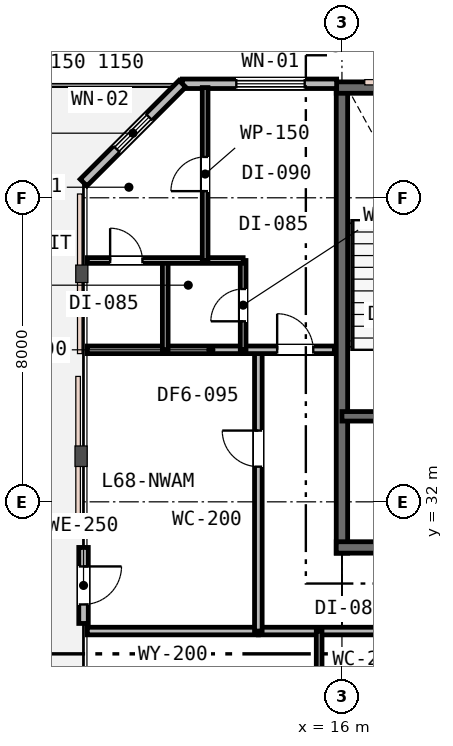
"""IFC4 building model, lengths in metres.
Left out: names, types, materials, properties, quantities, classifications, styles, units other than length and angle.
Written with IfcOpenShell. Run it as: python <this file> out.ifc"""

import sys

from ifc_helpers import new_model, si_unit, direction, frame, frame_2d, origin, place, context, subcontext, project, spatial, rectangle, extrude, element, fill, save


model = new_model("IFC4")
c1 = context("Model", 3, precision=1e-05, world=origin(), true_north=direction((0.0, 1.0)))
c2 = subcontext(c1, "Body", "Model", "MODEL_VIEW")
j1 = project(units=[si_unit("LENGTHUNIT", "METRE"), si_unit("PLANEANGLEUNIT", "RADIAN")], contexts=[c1])
p1 = place(None, origin())
s1 = spatial("IfcSite", under=j1, at=p1, CompositionType="ELEMENT")
p2 = place(p1, origin())
s2 = spatial("IfcBuilding", under=s1, at=p2, CompositionType="ELEMENT")
p3 = place(p2, frame((0.0, 0.0, 264.0)))
s3 = spatial("IfcBuildingStorey", under=s2, at=p3, CompositionType="ELEMENT", Elevation=264.0)
p4 = place(p3, frame((16.0, 30.65, 0.0), z_axis=(0.0, 0.0, 1.0), x_axis=(0.0, 1.0, 0.0)))
e1 = element("IfcWall", 1, at=p4, inside=s3, PredefinedType="SHEAR", context=c2, shape_type="SweptSolid", body=[
    extrude(rectangle(XDim=12.3, YDim=0.3, at=frame_2d((6.15, 0.0))), origin(), (0.0, 0.0, 1.0), 3.8),
])
p5 = place(p3, frame((15.85, 42.9, 0.0), z_axis=(0.0, 0.0, 1.0), x_axis=(1.0, 0.0, 0.0)))
e2 = element("IfcWall", 2, at=p5, inside=s3, PredefinedType="SHEAR", context=c2, shape_type="SweptSolid", body=[
    extrude(rectangle(XDim=24.3, YDim=0.3, at=frame_2d((12.15, 0.0))), origin(), (0.0, 0.0, 1.0), 3.8),
])
p6 = place(p3, frame((15.85, 30.8, 0.0), z_axis=(0.0, 0.0, 1.0), x_axis=(1.0, 0.0, 0.0)))
e3 = element("IfcWall", 3, at=p6, inside=s3, PredefinedType="SHEAR", context=c2, shape_type="SweptSolid", body=[
    extrude(rectangle(XDim=11.2, YDim=0.3, at=frame_2d((5.6, 0.0))), origin(), (0.0, 0.0, 1.0), 3.8),
])
p7 = place(p6, frame((2.45, 0.0, 0.0)))
e4 = element("IfcOpeningElement", 4, at=p7, cuts=e3, PredefinedType="OPENING", context=c2, shape_type="SweptSolid", body=[
    extrude(rectangle(XDim=1.1, YDim=2.15, at=frame_2d((0.55, 1.075))), frame((0.0, 0.16, 0.0), z_axis=(0.0, -1.0, 0.0), x_axis=(1.0, 0.0, 0.0)), (0.0, 0.0, 1.0), 0.32),
])
p8 = place(p3, frame((16.0, 34.25, 0.0), z_axis=(0.0, 0.0, 1.0), x_axis=(1.0, 0.0, 0.0)))
e5 = element("IfcWall", 5, at=p8, inside=s3, PredefinedType="SHEAR", context=c2, shape_type="SweptSolid", body=[
    extrude(rectangle(XDim=6.05, YDim=0.25, at=frame_2d((3.025, 0.0))), origin(), (0.0, 0.0, 1.0), 3.8),
])
p9 = place(p8, frame((1.25, 0.0, 0.0)))
e6 = element("IfcOpeningElement", 6, at=p9, cuts=e5, PredefinedType="OPENING", context=c2, shape_type="SweptSolid", body=[
    extrude(rectangle(XDim=1.0, YDim=2.15, at=frame_2d((0.5, 1.075))), frame((0.0, 0.135, 0.0), z_axis=(0.0, -1.0, 0.0), x_axis=(1.0, 0.0, 0.0)), (0.0, 0.0, 1.0), 0.27),
])
p10 = place(p8, frame((4.2, 0.0, 0.0)))
e7 = element("IfcOpeningElement", 7, at=p10, cuts=e5, PredefinedType="OPENING", context=c2, shape_type="SweptSolid", body=[
    extrude(rectangle(XDim=1.1, YDim=2.15, at=frame_2d((0.55, 1.075))), frame((0.0, 0.135, 0.0), z_axis=(0.0, -1.0, 0.0), x_axis=(1.0, 0.0, 0.0)), (0.0, 0.0, 1.0), 0.27),
])
p11 = place(p3, frame((15.86, 43.0, 0.0), z_axis=(0.0, 0.0, 1.0), x_axis=(-1.0, 0.0, 0.0)))
e8 = element("IfcWall", 8, at=p11, inside=s3, PredefinedType="STANDARD", context=c2, shape_type="SweptSolid", body=[
    extrude(rectangle(XDim=4.06, YDim=0.25, at=frame_2d((2.03, 0.0))), origin(), (0.0, 0.0, 1.0), 3.53),
])
p12 = place(p11, frame((0.84, 0.0, 0.75)))
e9 = element("IfcOpeningElement", 9, at=p12, cuts=e8, PredefinedType="OPENING", context=c2, shape_type="SweptSolid", body=[
    extrude(rectangle(XDim=1.8, YDim=1.85, at=frame_2d((0.9, 0.925))), frame((0.0, 0.135, 0.0), z_axis=(0.0, -1.0, 0.0), x_axis=(1.0, 0.0, 0.0)), (0.0, 0.0, 1.0), 0.27),
])
p13 = place(p3, frame((11.8, 43.0, 0.0), z_axis=(0.0, 0.0, 1.0), x_axis=(-0.707106781187, -0.707106781187, 0.0)))
e10 = element("IfcWall", 10, at=p13, inside=s3, PredefinedType="STANDARD", context=c2, shape_type="SweptSolid", body=[
    extrude(rectangle(XDim=3.677, YDim=0.25, at=frame_2d((1.839, 0.0))), origin(), (0.0, 0.0, 1.0), 3.53),
])
p14 = place(p13, frame((1.238, 0.0, 0.85)))
e11 = element("IfcOpeningElement", 11, at=p14, cuts=e10, PredefinedType="OPENING", context=c2, shape_type="SweptSolid", body=[
    extrude(rectangle(XDim=1.2, YDim=1.6, at=frame_2d((0.6, 0.8))), frame((0.0, 0.135, 0.0), z_axis=(0.0, -1.0, 0.0), x_axis=(1.0, 0.0, 0.0)), (0.0, 0.0, 1.0), 0.27),
])
p15 = place(p3, frame((9.2, 30.8, 0.0), z_axis=(0.0, 0.0, 1.0), x_axis=(0.0, -1.0, 0.0)))
e12 = element("IfcWall", 12, at=p15, inside=s3, PredefinedType="STANDARD", context=c2, shape_type="SweptSolid", body=[
    extrude(rectangle(XDim=2.0, YDim=0.25, at=frame_2d((1.0, 0.0))), origin(), (0.0, 0.0, 1.0), 3.53),
])
p16 = place(p15, frame((0.5, 0.0, 0.0)))
e13 = element("IfcOpeningElement", 13, at=p16, cuts=e12, PredefinedType="OPENING", context=c2, shape_type="SweptSolid", body=[
    extrude(rectangle(XDim=1.0, YDim=2.15, at=frame_2d((0.5, 1.075))), frame((0.0, 0.135, 0.0), z_axis=(0.0, -1.0, 0.0), x_axis=(1.0, 0.0, 0.0)), (0.0, 0.0, 1.0), 0.27),
])
p17 = place(p3, frame((9.3, 28.6, 0.0), z_axis=(0.0, 0.0, 1.0), x_axis=(1.0, 0.0, 0.0)))
e14 = element("IfcWall", 14, at=p17, inside=s3, PredefinedType="PARTITIONING", context=c2, shape_type="SweptSolid", body=[
    extrude(rectangle(XDim=4.5, YDim=0.2, at=frame_2d((2.25, 0.0))), origin(), (0.0, 0.0, 1.0), 3.53),
])
p18 = place(p3, frame((13.8, 28.6, 0.0), z_axis=(0.0, 0.0, 1.0), x_axis=(1.0, 0.0, 0.0)))
e15 = element("IfcWall", 15, at=p18, inside=s3, PredefinedType="PARTITIONING", context=c2, shape_type="SweptSolid", body=[
    extrude(rectangle(XDim=4.2, YDim=0.2, at=frame_2d((2.1, 0.0))), origin(), (0.0, 0.0, 1.0), 3.16),
])
p19 = place(p3, frame((13.8, 28.6, 0.0), z_axis=(0.0, 0.0, 1.0), x_axis=(0.0, 1.0, 0.0)))
e16 = element("IfcWall", 16, at=p19, inside=s3, PredefinedType="PARTITIONING", context=c2, shape_type="SweptSolid", body=[
    extrude(rectangle(XDim=7.4, YDim=0.2, at=frame_2d((3.7, 0.0))), origin(), (0.0, 0.0, 1.0), 3.53),
])
p20 = place(p19, frame((4.325, 0.0, 0.0)))
e17 = element("IfcOpeningElement", 17, at=p20, cuts=e16, PredefinedType="OPENING", context=c2, shape_type="SweptSolid", body=[
    extrude(rectangle(XDim=0.95, YDim=2.15, at=frame_2d((0.475, 1.075))), frame((0.0, 0.11, 0.0), z_axis=(0.0, -1.0, 0.0), x_axis=(1.0, 0.0, 0.0)), (0.0, 0.0, 1.0), 0.22),
])
p21 = place(p3, frame((9.3, 36.0, 0.0), z_axis=(0.0, 0.0, 1.0), x_axis=(1.0, 0.0, 0.0)))
e18 = element("IfcWall", 18, at=p21, inside=s3, PredefinedType="PARTITIONING", context=c2, shape_type="SweptSolid", body=[
    extrude(rectangle(XDim=6.5, YDim=0.2, at=frame_2d((3.25, 0.0))), origin(), (0.0, 0.0, 1.0), 3.53),
])
p22 = place(p21, frame((4.995, 0.0, 0.0)))
e19 = element("IfcOpeningElement", 19, at=p22, cuts=e18, PredefinedType="OPENING", context=c2, shape_type="SweptSolid", body=[
    extrude(rectangle(XDim=0.95, YDim=2.15, at=frame_2d((0.475, 1.075))), frame((0.0, 0.11, 0.0), z_axis=(0.0, -1.0, 0.0), x_axis=(1.0, 0.0, 0.0)), (0.0, 0.0, 1.0), 0.22),
])
p23 = place(p3, frame((13.4, 36.0, 0.0), z_axis=(0.0, 0.0, 1.0), x_axis=(0.0, 1.0, 0.0)))
e20 = element("IfcWall", 20, at=p23, inside=s3, PredefinedType="PARTITIONING", context=c2, shape_type="SweptSolid", body=[
    extrude(rectangle(XDim=2.35, YDim=0.15, at=frame_2d((1.175, 0.0))), origin(), (0.0, 0.0, 1.0), 3.53),
])
p24 = place(p23, frame((0.75, 0.0, 0.0)))
e21 = element("IfcOpeningElement", 21, at=p24, cuts=e20, PredefinedType="OPENING", context=c2, shape_type="SweptSolid", body=[
    extrude(rectangle(XDim=0.85, YDim=2.15, at=frame_2d((0.425, 1.075))), frame((0.0, 0.085, 0.0), z_axis=(0.0, -1.0, 0.0), x_axis=(1.0, 0.0, 0.0)), (0.0, 0.0, 1.0), 0.17),
])
p25 = place(p3, frame((11.35, 36.0, 0.0), z_axis=(0.0, 0.0, 1.0), x_axis=(0.0, 1.0, 0.0)))
e22 = element("IfcWall", 22, at=p25, inside=s3, PredefinedType="PARTITIONING", context=c2, shape_type="SweptSolid", body=[
    extrude(rectangle(XDim=2.35, YDim=0.15, at=frame_2d((1.175, 0.0))), origin(), (0.0, 0.0, 1.0), 3.53),
])
p26 = place(p3, frame((9.3, 38.35, 0.0), z_axis=(0.0, 0.0, 1.0), x_axis=(1.0, 0.0, 0.0)))
e23 = element("IfcWall", 23, at=p26, inside=s3, PredefinedType="PARTITIONING", context=c2, shape_type="SweptSolid", body=[
    extrude(rectangle(XDim=4.1, YDim=0.15, at=frame_2d((2.05, 0.0))), origin(), (0.0, 0.0, 1.0), 3.53),
])
p27 = place(p26, frame((0.6, 0.0, 0.0)))
e24 = element("IfcOpeningElement", 24, at=p27, cuts=e23, PredefinedType="OPENING", context=c2, shape_type="SweptSolid", body=[
    extrude(rectangle(XDim=0.85, YDim=2.15, at=frame_2d((0.425, 1.075))), frame((0.0, 0.085, 0.0), z_axis=(0.0, -1.0, 0.0), x_axis=(1.0, 0.0, 0.0)), (0.0, 0.0, 1.0), 0.17),
])
p28 = place(p3, frame((12.4, 38.35, 0.0), z_axis=(0.0, 0.0, 1.0), x_axis=(0.0, 1.0, 0.0)))
e25 = element("IfcWall", 25, at=p28, inside=s3, PredefinedType="PARTITIONING", context=c2, shape_type="SweptSolid", body=[
    extrude(rectangle(XDim=4.55, YDim=0.15, at=frame_2d((2.275, 0.0))), origin(), (0.0, 0.0, 1.0), 3.53),
])
p29 = place(p28, frame((1.825, 0.0, 0.0)))
e26 = element("IfcOpeningElement", 26, at=p29, cuts=e25, PredefinedType="OPENING", context=c2, shape_type="SweptSolid", body=[
    extrude(rectangle(XDim=0.9, YDim=2.15, at=frame_2d((0.45, 1.075))), frame((0.0, 0.085, 0.0), z_axis=(0.0, -1.0, 0.0), x_axis=(1.0, 0.0, 0.0)), (0.0, 0.0, 1.0), 0.17),
])
p30 = place(p3, frame((15.4, 19.396, 0.0), z_axis=(0.0, 0.0, 1.0), x_axis=(0.0, 1.0, 0.0)))
e27 = element("IfcWall", 27, at=p30, inside=s3, PredefinedType="PARTITIONING", context=c2, shape_type="SweptSolid", body=[
    extrude(rectangle(XDim=9.204, YDim=0.15, at=frame_2d((4.602, 0.0))), origin(), (0.0, 0.0, 1.0), 3.53),
])
p31 = place(p30, frame((0.6, 0.0, 0.0)))
e28 = element("IfcOpeningElement", 28, at=p31, cuts=e27, PredefinedType="OPENING", context=c2, shape_type="SweptSolid", body=[
    extrude(rectangle(XDim=0.85, YDim=2.15, at=frame_2d((0.425, 1.075))), frame((0.0, 0.085, 0.0), z_axis=(0.0, -1.0, 0.0), x_axis=(1.0, 0.0, 0.0)), (0.0, 0.0, 1.0), 0.17),
])
p32 = place(p30, frame((2.65, 0.0, 0.0)))
e29 = element("IfcOpeningElement", 29, at=p32, cuts=e27, PredefinedType="OPENING", context=c2, shape_type="SweptSolid", body=[
    extrude(rectangle(XDim=0.85, YDim=2.15, at=frame_2d((0.425, 1.075))), frame((0.0, 0.085, 0.0), z_axis=(0.0, -1.0, 0.0), x_axis=(1.0, 0.0, 0.0)), (0.0, 0.0, 1.0), 0.17),
])
p33 = place(p30, frame((6.593, 0.0, 0.0)))
e30 = element("IfcOpeningElement", 30, at=p33, cuts=e27, PredefinedType="OPENING", context=c2, shape_type="SweptSolid", body=[
    extrude(rectangle(XDim=0.85, YDim=2.15, at=frame_2d((0.425, 1.075))), frame((0.0, 0.085, 0.0), z_axis=(0.0, -1.0, 0.0), x_axis=(1.0, 0.0, 0.0)), (0.0, 0.0, 1.0), 0.17),
])
p34 = place(p12, origin())
e31 = element("IfcWindow", 31, at=p34, inside=s3, PartitioningType="SINGLE_PANEL", PredefinedType="WINDOW", context=c2, shape_type="SweptSolid", body=[
    extrude(rectangle(XDim=1.8, YDim=1.85, at=frame_2d((0.9, 0.925))), frame((0.0, 0.03, 0.0), z_axis=(0.0, -1.0, 0.0), x_axis=(1.0, 0.0, 0.0)), (0.0, 0.0, 1.0), 0.06),
])
fill(e9, e31)
p35 = place(p14, origin())
e32 = element("IfcWindow", 32, at=p35, inside=s3, PartitioningType="SINGLE_PANEL", PredefinedType="WINDOW", context=c2, shape_type="SweptSolid", body=[
    extrude(rectangle(XDim=1.2, YDim=1.6, at=frame_2d((0.6, 0.8))), frame((0.0, 0.03, 0.0), z_axis=(0.0, -1.0, 0.0), x_axis=(1.0, 0.0, 0.0)), (0.0, 0.0, 1.0), 0.06),
])
fill(e11, e32)
p36 = place(p16, origin())
e33 = element("IfcDoor", 33, at=p36, inside=s3, OperationType="SINGLE_SWING_LEFT", PredefinedType="DOOR", context=c2, shape_type="SweptSolid", body=[
    extrude(rectangle(XDim=1.0, YDim=2.15, at=frame_2d((0.5, 1.075))), frame((0.0, 0.025, 0.0), z_axis=(0.0, -1.0, 0.0), x_axis=(1.0, 0.0, 0.0)), (0.0, 0.0, 1.0), 0.05),
])
fill(e13, e33)
p37 = place(p20, origin())
e34 = element("IfcDoor", 34, at=p37, inside=s3, OperationType="SINGLE_SWING_RIGHT", PredefinedType="DOOR", context=c2, shape_type="SweptSolid", body=[
    extrude(rectangle(XDim=0.95, YDim=2.15, at=frame_2d((0.475, 1.075))), frame((0.0, 0.025, 0.0), z_axis=(0.0, -1.0, 0.0), x_axis=(1.0, 0.0, 0.0)), (0.0, 0.0, 1.0), 0.05),
])
fill(e17, e34)
p38 = place(p22, origin())
e35 = element("IfcDoor", 35, at=p38, inside=s3, OperationType="SINGLE_SWING_LEFT", PredefinedType="DOOR", context=c2, shape_type="SweptSolid", body=[
    extrude(rectangle(XDim=0.95, YDim=2.15, at=frame_2d((0.475, 1.075))), frame((0.0, 0.025, 0.0), z_axis=(0.0, -1.0, 0.0), x_axis=(1.0, 0.0, 0.0)), (0.0, 0.0, 1.0), 0.05),
])
fill(e19, e35)
p39 = place(p24, origin())
e36 = element("IfcDoor", 36, at=p39, inside=s3, OperationType="SINGLE_SWING_LEFT", PredefinedType="DOOR", context=c2, shape_type="SweptSolid", body=[
    extrude(rectangle(XDim=0.85, YDim=2.15, at=frame_2d((0.425, 1.075))), frame((0.0, 0.025, 0.0), z_axis=(0.0, -1.0, 0.0), x_axis=(1.0, 0.0, 0.0)), (0.0, 0.0, 1.0), 0.05),
])
fill(e21, e36)
p40 = place(p27, origin())
e37 = element("IfcDoor", 37, at=p40, inside=s3, OperationType="SINGLE_SWING_LEFT", PredefinedType="DOOR", context=c2, shape_type="SweptSolid", body=[
    extrude(rectangle(XDim=0.85, YDim=2.15, at=frame_2d((0.425, 1.075))), frame((0.0, 0.025, 0.0), z_axis=(0.0, -1.0, 0.0), x_axis=(1.0, 0.0, 0.0)), (0.0, 0.0, 1.0), 0.05),
])
fill(e24, e37)
p41 = place(p29, origin())
e38 = element("IfcDoor", 38, at=p41, inside=s3, OperationType="SINGLE_SWING_LEFT", PredefinedType="DOOR", context=c2, shape_type="SweptSolid", body=[
    extrude(rectangle(XDim=0.9, YDim=2.15, at=frame_2d((0.45, 1.075))), frame((0.0, 0.025, 0.0), z_axis=(0.0, -1.0, 0.0), x_axis=(1.0, 0.0, 0.0)), (0.0, 0.0, 1.0), 0.05),
])
fill(e26, e38)
save(model, sys.argv[1])
